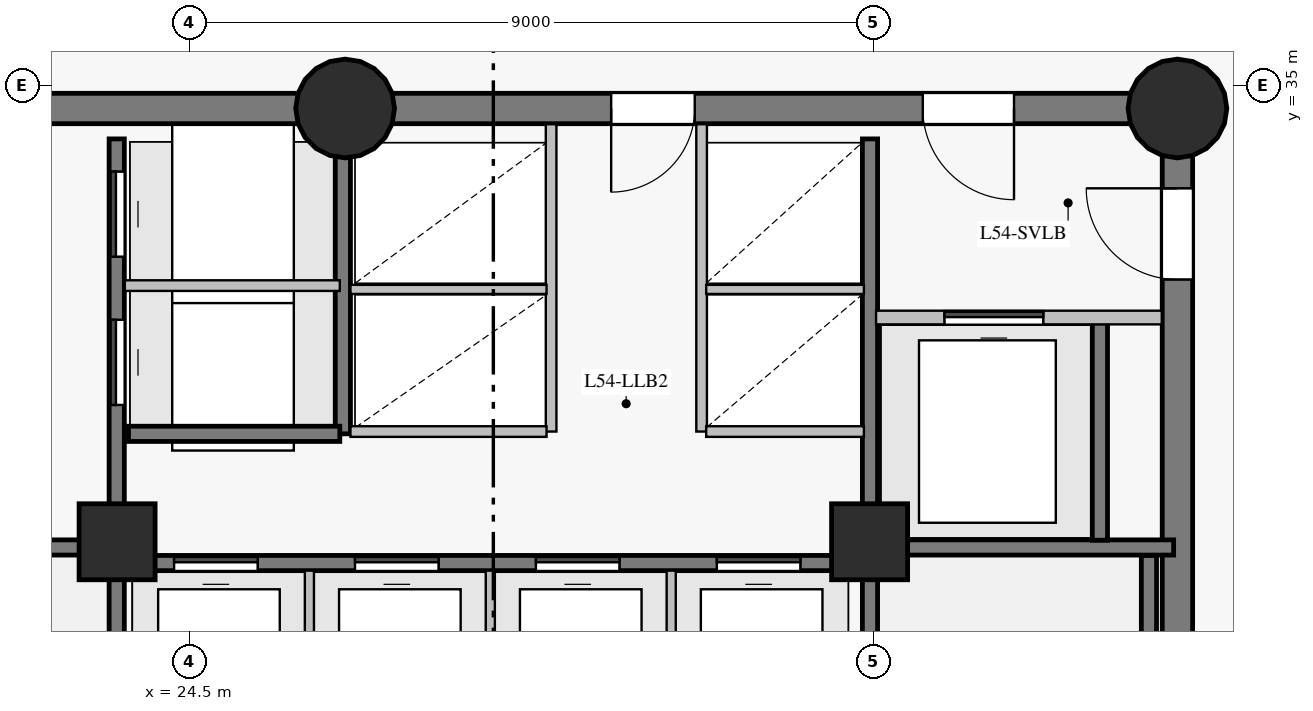
"""IFC4 building model, lengths in metres.
Left out: names, types, materials, properties, quantities, classifications, styles, units other than length and angle.
Written with IfcOpenShell. Run it as: python <this file> out.ifc"""

import sys

from ifc_helpers import new_model, si_unit, direction, frame, frame_2d, origin, origin_with_axes, origin_2d, place, context, subcontext, project, spatial, rectangle, circle, extrude, source, transform, mapped, element, fill, save


model = new_model("IFC4")
c1 = context("Model", 3, precision=1e-05, world=origin(), true_north=direction((0.0, 1.0)))
c2 = subcontext(c1, "Body", "Model", "MODEL_VIEW")
j1 = project(units=[si_unit("LENGTHUNIT", "METRE"), si_unit("PLANEANGLEUNIT", "RADIAN")], contexts=[c1])
p1 = place(None, origin())
s1 = spatial("IfcSite", under=j1, at=p1, CompositionType="ELEMENT")
p2 = place(p1, origin())
s2 = spatial("IfcBuilding", under=s1, at=p2, CompositionType="ELEMENT")
p3 = place(p2, frame((0.0, 0.0, 187.05)))
s3 = spatial("IfcBuildingStorey", under=s2, at=p3, CompositionType="ELEMENT", Elevation=187.05)
p4 = place(p3, frame((37.5, 18.3, 0.0), z_axis=(0.0, 0.0, 1.0), x_axis=(0.0, 1.0, 0.0)))
e1 = element("IfcWall", 1, at=p4, inside=s3, PredefinedType="SHEAR", context=c2, shape_type="SweptSolid", body=[
    extrude(rectangle(XDim=16.4, YDim=0.4, at=frame_2d((8.2, 0.0))), origin(), (0.0, 0.0, 1.0), 2.825),
])
p5 = place(p4, frame((14.15, 0.0, 0.0)))
e2 = element("IfcOpeningElement", 2, at=p5, cuts=e1, PredefinedType="OPENING", context=c2, shape_type="SweptSolid", body=[
    extrude(rectangle(XDim=1.2, YDim=2.15, at=frame_2d((0.6, 1.075))), frame((0.0, 0.21, 0.0), z_axis=(0.0, -1.0, 0.0), x_axis=(1.0, 0.0, 0.0)), (0.0, 0.0, 1.0), 0.42),
])
p6 = place(p3, frame((37.5, 34.7, 0.0), z_axis=(0.0, 0.0, 1.0), x_axis=(-1.0, 0.0, 0.0)))
e3 = element("IfcWall", 3, at=p6, inside=s3, PredefinedType="SHEAR", context=c2, shape_type="SweptSolid", body=[
    extrude(rectangle(XDim=10.95, YDim=0.4, at=frame_2d((5.475, 0.0))), origin(), (0.0, 0.0, 1.0), 2.825),
])
p7 = place(p6, frame((2.15, 0.0, 0.0)))
e4 = element("IfcOpeningElement", 4, at=p7, cuts=e3, PredefinedType="OPENING", context=c2, shape_type="SweptSolid", body=[
    extrude(rectangle(XDim=1.2, YDim=2.15, at=frame_2d((0.6, 1.075))), frame((0.0, 0.21, 0.0), z_axis=(0.0, -1.0, 0.0), x_axis=(1.0, 0.0, 0.0)), (0.0, 0.0, 1.0), 0.42),
])
p8 = place(p6, frame((6.35, 0.0, 0.0)))
e5 = element("IfcOpeningElement", 5, at=p8, cuts=e3, PredefinedType="OPENING", context=c2, shape_type="SweptSolid", body=[
    extrude(rectangle(XDim=1.1, YDim=2.15, at=frame_2d((0.55, 1.075))), frame((0.0, 0.21, 0.0), z_axis=(0.0, -1.0, 0.0), x_axis=(1.0, 0.0, 0.0)), (0.0, 0.0, 1.0), 0.42),
])
p9 = place(p3, frame((26.55, 34.7, 0.0), z_axis=(0.0, 0.0, 1.0), x_axis=(-1.0, 0.0, 0.0)))
e6 = element("IfcWall", 6, at=p9, inside=s3, PredefinedType="SHEAR", context=c2, shape_type="SweptSolid", body=[
    extrude(rectangle(XDim=7.05, YDim=0.4, at=frame_2d((3.525, 0.0))), origin(), (0.0, 0.0, 1.0), 2.825),
])
p10 = place(p9, frame((4.25, 0.0, 0.0)))
e7 = element("IfcOpeningElement", 7, at=p10, cuts=e6, PredefinedType="OPENING", context=c2, shape_type="SweptSolid", body=[
    extrude(rectangle(XDim=1.1, YDim=2.15, at=frame_2d((0.55, 1.075))), frame((0.0, 0.21, 0.0), z_axis=(0.0, -1.0, 0.0), x_axis=(1.0, 0.0, 0.0)), (0.0, 0.0, 1.0), 0.42),
])
m1 = source(origin_with_axes(), c2, "Body", "SweptSolid", [
    extrude(circle(Radius=0.65, at=origin_2d()), origin(), (0.0, 0.0, 1.0), 3.05),
])
for number, where, z_axis, x_axis in (
    (8, (26.55, 34.7, 0.0), (0.0, 0.0, 1.0), (1.0, 0.0, 0.0)),
    (9, (37.5, 34.7, 0.0), (0.0, 0.0, 1.0), (1.0, 0.0, 0.0)),
):
    element("IfcColumn", number, at=place(p3, frame(where, z_axis=z_axis, x_axis=x_axis)), inside=s3, PredefinedType="COLUMN", context=c2, shape_type="MappedRepresentation", body=[
        mapped(m1, transform((0.0, 0.0, 0.0), scale=1.0)),
    ])
m2 = source(origin_with_axes(), c2, "Body", "SweptSolid", [
    extrude(rectangle(XDim=1.0, YDim=1.0, at=origin_2d()), origin(), (0.0, 0.0, 1.0), 3.05),
])
for number, where, z_axis, x_axis in (
    (10, (23.55, 29.0, 0.0), (0.0, 0.0, 1.0), (1.0, 0.0, 0.0)),
    (11, (33.45, 29.0, 0.0), (0.0, 0.0, 1.0), (1.0, 0.0, 0.0)),
):
    element("IfcColumn", number, at=place(p3, frame(where, z_axis=z_axis, x_axis=x_axis)), inside=s3, PredefinedType="COLUMN", context=c2, shape_type="MappedRepresentation", body=[
        mapped(m2, transform((0.0, 0.0, 0.0), scale=1.0)),
    ])
p11 = place(p3, frame((23.545, 18.7, 0.0), z_axis=(0.0, 0.0, 1.0), x_axis=(0.0, 1.0, 0.0)))
e12 = element("IfcWall", 12, at=p11, inside=s3, PredefinedType="SHEAR", context=c2, shape_type="SweptSolid", body=[
    extrude(rectangle(XDim=15.6, YDim=0.2, at=frame_2d((7.8, 0.0))), origin(), (0.0, 0.0, 1.0), 2.825),
])
p12 = place(p11, frame((2.75, 0.0, 0.0)))
e13 = element("IfcOpeningElement", 13, at=p12, cuts=e12, PredefinedType="OPENING", context=c2, shape_type="SweptSolid", body=[
    extrude(rectangle(XDim=1.15, YDim=2.15, at=frame_2d((0.575, 1.075))), frame((0.0, 0.11, 0.0), z_axis=(0.0, -1.0, 0.0), x_axis=(1.0, 0.0, 0.0)), (0.0, 0.0, 1.0), 0.22),
])
p13 = place(p11, frame((0.14, 0.0, 0.0)))
e14 = element("IfcOpeningElement", 14, at=p13, cuts=e12, PredefinedType="OPENING", context=c2, shape_type="SweptSolid", body=[
    extrude(rectangle(XDim=0.88, YDim=2.1, at=frame_2d((0.44, 1.05))), frame((0.0, 0.11, 0.0), z_axis=(0.0, -1.0, 0.0), x_axis=(1.0, 0.0, 0.0)), (0.0, 0.0, 1.0), 0.22),
])
p14 = place(p11, frame((1.36, 0.0, 0.0)))
e15 = element("IfcOpeningElement", 15, at=p14, cuts=e12, PredefinedType="OPENING", context=c2, shape_type="SweptSolid", body=[
    extrude(rectangle(XDim=0.88, YDim=2.1, at=frame_2d((0.44, 1.05))), frame((0.0, 0.11, 0.0), z_axis=(0.0, -1.0, 0.0), x_axis=(1.0, 0.0, 0.0)), (0.0, 0.0, 1.0), 0.22),
])
p15 = place(p11, frame((12.1, 0.0, 0.0)))
e16 = element("IfcOpeningElement", 16, at=p15, cuts=e12, PredefinedType="OPENING", context=c2, shape_type="SweptSolid", body=[
    extrude(rectangle(XDim=1.12, YDim=2.15, at=frame_2d((0.56, 1.075))), frame((0.0, 0.11, 0.0), z_axis=(0.0, -1.0, 0.0), x_axis=(1.0, 0.0, 0.0)), (0.0, 0.0, 1.0), 0.22),
])
p16 = place(p11, frame((14.05, 0.0, 0.0)))
e17 = element("IfcOpeningElement", 17, at=p16, cuts=e12, PredefinedType="OPENING", context=c2, shape_type="SweptSolid", body=[
    extrude(rectangle(XDim=1.12, YDim=2.15, at=frame_2d((0.56, 1.075))), frame((0.0, 0.11, 0.0), z_axis=(0.0, -1.0, 0.0), x_axis=(1.0, 0.0, 0.0)), (0.0, 0.0, 1.0), 0.22),
])
p17 = place(p3, frame((33.455, 18.7, 0.0), z_axis=(0.0, 0.0, 1.0), x_axis=(0.0, 1.0, 0.0)))
e18 = element("IfcWall", 18, at=p17, inside=s3, PredefinedType="SHEAR", context=c2, shape_type="SweptSolid", body=[
    extrude(rectangle(XDim=15.6, YDim=0.2, at=frame_2d((7.8, 0.0))), origin(), (0.0, 0.0, 1.0), 2.825),
])
p18 = place(p17, frame((2.75, 0.0, 0.0)))
e19 = element("IfcOpeningElement", 19, at=p18, cuts=e18, PredefinedType="OPENING", context=c2, shape_type="SweptSolid", body=[
    extrude(rectangle(XDim=1.15, YDim=2.15, at=frame_2d((0.575, 1.075))), frame((0.0, 0.11, 0.0), z_axis=(0.0, -1.0, 0.0), x_axis=(1.0, 0.0, 0.0)), (0.0, 0.0, 1.0), 0.22),
])
p19 = place(p17, frame((0.55, 0.0, 0.0)))
e20 = element("IfcOpeningElement", 20, at=p19, cuts=e18, PredefinedType="OPENING", context=c2, shape_type="SweptSolid", body=[
    extrude(rectangle(XDim=0.94, YDim=2.1, at=frame_2d((0.47, 1.05))), frame((0.0, 0.11, 0.0), z_axis=(0.0, -1.0, 0.0), x_axis=(1.0, 0.0, 0.0)), (0.0, 0.0, 1.0), 0.22),
])
p20 = place(p3, frame((23.7, 28.72, 0.0), z_axis=(0.0, 0.0, 1.0), x_axis=(1.0, 0.0, 0.0)))
e21 = element("IfcWall", 21, at=p20, inside=s3, PredefinedType="SHEAR", context=c2, shape_type="SweptSolid", body=[
    extrude(rectangle(XDim=9.6, YDim=0.2, at=frame_2d((4.8, 0.0))), origin(), (0.0, 0.0, 1.0), 2.825),
])
p21 = place(p20, frame((0.6, 0.0, 0.0)))
e22 = element("IfcOpeningElement", 22, at=p21, cuts=e21, PredefinedType="OPENING", context=c2, shape_type="SweptSolid", body=[
    extrude(rectangle(XDim=1.1, YDim=2.15, at=frame_2d((0.55, 1.075))), frame((0.0, 0.11, 0.0), z_axis=(0.0, -1.0, 0.0), x_axis=(1.0, 0.0, 0.0)), (0.0, 0.0, 1.0), 0.22),
])
p22 = place(p20, frame((2.98, 0.0, 0.0)))
e23 = element("IfcOpeningElement", 23, at=p22, cuts=e21, PredefinedType="OPENING", context=c2, shape_type="SweptSolid", body=[
    extrude(rectangle(XDim=1.1, YDim=2.15, at=frame_2d((0.55, 1.075))), frame((0.0, 0.11, 0.0), z_axis=(0.0, -1.0, 0.0), x_axis=(1.0, 0.0, 0.0)), (0.0, 0.0, 1.0), 0.22),
])
p23 = place(p20, frame((5.36, 0.0, 0.0)))
e24 = element("IfcOpeningElement", 24, at=p23, cuts=e21, PredefinedType="OPENING", context=c2, shape_type="SweptSolid", body=[
    extrude(rectangle(XDim=1.1, YDim=2.15, at=frame_2d((0.55, 1.075))), frame((0.0, 0.11, 0.0), z_axis=(0.0, -1.0, 0.0), x_axis=(1.0, 0.0, 0.0)), (0.0, 0.0, 1.0), 0.22),
])
p24 = place(p20, frame((7.74, 0.0, 0.0)))
e25 = element("IfcOpeningElement", 25, at=p24, cuts=e21, PredefinedType="OPENING", context=c2, shape_type="SweptSolid", body=[
    extrude(rectangle(XDim=1.1, YDim=2.15, at=frame_2d((0.55, 1.075))), frame((0.0, 0.11, 0.0), z_axis=(0.0, -1.0, 0.0), x_axis=(1.0, 0.0, 0.0)), (0.0, 0.0, 1.0), 0.22),
])
p25 = place(p3, frame((37.125, 21.32, 0.0), z_axis=(0.0, 0.0, 1.0), x_axis=(0.0, 1.0, 0.0)))
e26 = element("IfcWall", 26, at=p25, inside=s3, PredefinedType="SHEAR", context=c2, shape_type="SweptSolid", body=[
    extrude(rectangle(XDim=7.5, YDim=0.2, at=frame_2d((3.75, 0.0))), origin(), (0.0, 0.0, 1.0), 2.825),
])
for number, where, z_axis, x_axis in (
    (27, (33.455, 28.925, 0.0), (0.0, 0.0, 1.0), (1.0, 0.0, 0.0)),
    (28, (19.55, 28.925, 0.0), (0.0, 0.0, 1.0), (1.0, 0.0, 0.0)),
):
    element("IfcWall", number, at=place(p3, frame(where, z_axis=z_axis, x_axis=x_axis)), inside=s3, PredefinedType="SHEAR", context=c2, shape_type="SweptSolid", body=[
        extrude(rectangle(XDim=3.995, YDim=0.2, at=frame_2d((1.998, 0.0))), origin(), (0.0, 0.0, 1.0), 2.825),
    ])
p26 = place(p3, frame((26.52, 30.42, 0.0), z_axis=(0.0, 0.0, 1.0), x_axis=(0.0, 1.0, 0.0)))
e29 = element("IfcWall", 29, at=p26, inside=s3, PredefinedType="SHEAR", context=c2, shape_type="SweptSolid", body=[
    extrude(rectangle(XDim=3.86, YDim=0.2, at=frame_2d((1.93, 0.0))), origin(), (0.0, 0.0, 1.0), 2.825),
])
p27 = place(p3, frame((36.48, 29.02, 0.0), z_axis=(0.0, 0.0, 1.0), x_axis=(0.0, 1.0, 0.0)))
e30 = element("IfcWall", 30, at=p27, inside=s3, PredefinedType="SHEAR", context=c2, shape_type="SweptSolid", body=[
    extrude(rectangle(XDim=2.86, YDim=0.2, at=frame_2d((1.43, 0.0))), origin(), (0.0, 0.0, 1.0), 2.825),
])
p28 = place(p3, frame((23.7, 30.42, 0.0), z_axis=(0.0, 0.0, 1.0), x_axis=(1.0, 0.0, 0.0)))
e31 = element("IfcWall", 31, at=p28, inside=s3, PredefinedType="SHEAR", context=c2, shape_type="SweptSolid", body=[
    extrude(rectangle(XDim=2.78, YDim=0.2, at=frame_2d((1.39, 0.0))), origin(), (0.0, 0.0, 1.0), 2.825),
])
for number, where, z_axis, x_axis in (
    (32, (29.26, 30.45, 0.0), (0.0, 0.0, 1.0), (0.0, 1.0, 0.0)),
    (33, (31.24, 30.45, 0.0), (0.0, 0.0, 1.0), (0.0, 1.0, 0.0)),
):
    element("IfcWall", number, at=place(p3, frame(where, z_axis=z_axis, x_axis=x_axis)), inside=s3, PredefinedType="PARTITIONING", context=c2, shape_type="SweptSolid", body=[
        extrude(rectangle(XDim=4.043, YDim=0.14, at=frame_2d((2.021, 0.0))), origin(), (0.0, 0.0, 1.0), 2.825),
    ])
p29 = place(p3, frame((33.535, 31.95, 0.0), z_axis=(0.0, 0.0, 1.0), x_axis=(1.0, 0.0, 0.0)))
e34 = element("IfcWall", 34, at=p29, inside=s3, PredefinedType="PARTITIONING", context=c2, shape_type="SweptSolid", body=[
    extrude(rectangle(XDim=3.759, YDim=0.18, at=frame_2d((1.879, 0.0))), origin(), (0.0, 0.0, 1.0), 2.825),
])
p30 = place(p29, frame((0.9, 0.0, 0.0)))
e35 = element("IfcOpeningElement", 35, at=p30, cuts=e34, PredefinedType="OPENING", context=c2, shape_type="SweptSolid", body=[
    extrude(rectangle(XDim=1.3, YDim=2.2, at=frame_2d((0.65, 1.1))), frame((0.0, 0.1, 0.0), z_axis=(0.0, -1.0, 0.0), x_axis=(1.0, 0.0, 0.0)), (0.0, 0.0, 1.0), 0.2),
])
p31 = place(p3, frame((23.652, 32.37, 0.0), z_axis=(0.0, 0.0, 1.0), x_axis=(1.0, 0.0, 0.0)))
e36 = element("IfcWall", 36, at=p31, inside=s3, PredefinedType="PARTITIONING", context=c2, shape_type="SweptSolid", body=[
    extrude(rectangle(XDim=2.828, YDim=0.14, at=frame_2d((1.414, 0.0))), origin(), (0.0, 0.0, 1.0), 2.825),
])
for number, where, z_axis, x_axis in (
    (37, (26.08, 26.02, 0.0), (0.0, 0.0, 1.0), (0.0, 1.0, 0.0)),
    (38, (28.46, 26.02, 0.0), (0.0, 0.0, 1.0), (0.0, 1.0, 0.0)),
    (39, (30.84, 26.02, 0.0), (0.0, 0.0, 1.0), (0.0, 1.0, 0.0)),
):
    element("IfcWall", number, at=place(p3, frame(where, z_axis=z_axis, x_axis=x_axis)), inside=s3, PredefinedType="PARTITIONING", context=c2, shape_type="SweptSolid", body=[
        extrude(rectangle(XDim=2.6, YDim=0.12, at=frame_2d((1.3, 0.0))), origin(), (0.0, 0.0, 1.0), 2.825),
    ])
p32 = place(p3, frame((26.62, 30.45, 0.0), z_axis=(0.0, 0.0, 1.0), x_axis=(1.0, 0.0, 0.0)))
e40 = element("IfcWall", 40, at=p32, inside=s3, PredefinedType="PARTITIONING", context=c2, shape_type="SweptSolid", body=[
    extrude(rectangle(XDim=2.58, YDim=0.14, at=frame_2d((1.29, 0.0))), origin(), (0.0, 0.0, 1.0), 2.825),
])
p33 = place(p3, frame((26.62, 32.32, 0.0), z_axis=(0.0, 0.0, 1.0), x_axis=(1.0, 0.0, 0.0)))
e41 = element("IfcWall", 41, at=p33, inside=s3, PredefinedType="PARTITIONING", context=c2, shape_type="SweptSolid", body=[
    extrude(rectangle(XDim=2.58, YDim=0.12, at=frame_2d((1.29, 0.0))), origin(), (0.0, 0.0, 1.0), 2.825),
])
p34 = place(p3, frame((31.3, 30.45, 0.0), z_axis=(0.0, 0.0, 1.0), x_axis=(1.0, 0.0, 0.0)))
e42 = element("IfcWall", 42, at=p34, inside=s3, PredefinedType="PARTITIONING", context=c2, shape_type="SweptSolid", body=[
    extrude(rectangle(XDim=2.075, YDim=0.14, at=frame_2d((1.038, 0.0))), origin(), (0.0, 0.0, 1.0), 2.825),
])
p35 = place(p3, frame((31.3, 32.32, 0.0), z_axis=(0.0, 0.0, 1.0), x_axis=(1.0, 0.0, 0.0)))
e43 = element("IfcWall", 43, at=p35, inside=s3, PredefinedType="PARTITIONING", context=c2, shape_type="SweptSolid", body=[
    extrude(rectangle(XDim=2.075, YDim=0.12, at=frame_2d((1.038, 0.0))), origin(), (0.0, 0.0, 1.0), 2.825),
])
m3 = source(origin_with_axes(), c2, "Body", "SweptSolid", [
    extrude(rectangle(XDim=1.2, YDim=2.15, at=frame_2d((0.6, 1.075))), frame((0.0, 0.025, 0.0), z_axis=(0.0, -1.0, 0.0), x_axis=(1.0, 0.0, 0.0)), (0.0, 0.0, 1.0), 0.05),
])
p36 = place(p5, origin())
e44 = element("IfcDoor", 44, at=p36, inside=s3, OperationType="SINGLE_SWING_RIGHT", PredefinedType="DOOR", context=c2, shape_type="MappedRepresentation", body=[
    mapped(m3, transform((0.0, 0.0, 0.0), scale=1.0)),
])
fill(e2, e44)
p37 = place(p7, origin())
e45 = element("IfcDoor", 45, at=p37, inside=s3, OperationType="SINGLE_SWING_LEFT", PredefinedType="DOOR", context=c2, shape_type="MappedRepresentation", body=[
    mapped(m3, transform((0.0, 0.0, 0.0), scale=1.0)),
])
fill(e4, e45)
m4 = source(origin_with_axes(), c2, "Body", "SweptSolid", [
    extrude(rectangle(XDim=1.3, YDim=2.2, at=frame_2d((0.65, 1.1))), frame((0.0, 0.025, 0.0), z_axis=(0.0, -1.0, 0.0), x_axis=(1.0, 0.0, 0.0)), (0.0, 0.0, 1.0), 0.05),
])
p38 = place(p30, origin())
e46 = element("IfcDoor", 46, at=p38, inside=s3, OperationType="SLIDING_TO_LEFT", PredefinedType="DOOR", context=c2, shape_type="MappedRepresentation", body=[
    mapped(m4, transform((0.0, 0.0, 0.0), scale=1.0)),
])
fill(e35, e46)
m5 = source(origin_with_axes(), c2, "Body", "SweptSolid", [
    extrude(rectangle(XDim=1.1, YDim=2.15, at=frame_2d((0.55, 1.075))), frame((0.0, 0.025, 0.0), z_axis=(0.0, -1.0, 0.0), x_axis=(1.0, 0.0, 0.0)), (0.0, 0.0, 1.0), 0.05),
])
p39 = place(p21, origin())
e47 = element("IfcDoor", 47, at=p39, inside=s3, OperationType="SLIDING_TO_LEFT", PredefinedType="DOOR", context=c2, shape_type="MappedRepresentation", body=[
    mapped(m5, transform((0.0, 0.0, 0.0), scale=1.0)),
])
fill(e22, e47)
p40 = place(p22, origin())
e48 = element("IfcDoor", 48, at=p40, inside=s3, OperationType="SLIDING_TO_RIGHT", PredefinedType="DOOR", context=c2, shape_type="MappedRepresentation", body=[
    mapped(m5, transform((0.0, 0.0, 0.0), scale=1.0)),
])
fill(e23, e48)
p41 = place(p23, origin())
e49 = element("IfcDoor", 49, at=p41, inside=s3, OperationType="SLIDING_TO_LEFT", PredefinedType="DOOR", context=c2, shape_type="MappedRepresentation", body=[
    mapped(m5, transform((0.0, 0.0, 0.0), scale=1.0)),
])
fill(e24, e49)
p42 = place(p24, origin())
e50 = element("IfcDoor", 50, at=p42, inside=s3, OperationType="SLIDING_TO_RIGHT", PredefinedType="DOOR", context=c2, shape_type="MappedRepresentation", body=[
    mapped(m5, transform((0.0, 0.0, 0.0), scale=1.0)),
])
fill(e25, e50)
p43 = place(p8, origin())
e51 = element("IfcDoor", 51, at=p43, inside=s3, OperationType="SINGLE_SWING_RIGHT", PredefinedType="DOOR", context=c2, shape_type="MappedRepresentation", body=[
    mapped(m5, transform((0.0, 0.0, 0.0), scale=1.0)),
])
fill(e5, e51)
m6 = source(origin_with_axes(), c2, "Body", "SweptSolid", [
    extrude(rectangle(XDim=1.12, YDim=2.15, at=frame_2d((0.56, 1.075))), frame((0.0, 0.025, 0.0), z_axis=(0.0, -1.0, 0.0), x_axis=(1.0, 0.0, 0.0)), (0.0, 0.0, 1.0), 0.05),
])
p44 = place(p15, origin())
e52 = element("IfcDoor", 52, at=p44, inside=s3, OperationType="SLIDING_TO_LEFT", PredefinedType="DOOR", context=c2, shape_type="MappedRepresentation", body=[
    mapped(m6, transform((0.0, 0.0, 0.0), scale=1.0)),
])
fill(e16, e52)
p45 = place(p16, origin())
e53 = element("IfcDoor", 53, at=p45, inside=s3, OperationType="SLIDING_TO_RIGHT", PredefinedType="DOOR", context=c2, shape_type="MappedRepresentation", body=[
    mapped(m6, transform((0.0, 0.0, 0.0), scale=1.0)),
])
fill(e17, e53)
save(model, sys.argv[1])
